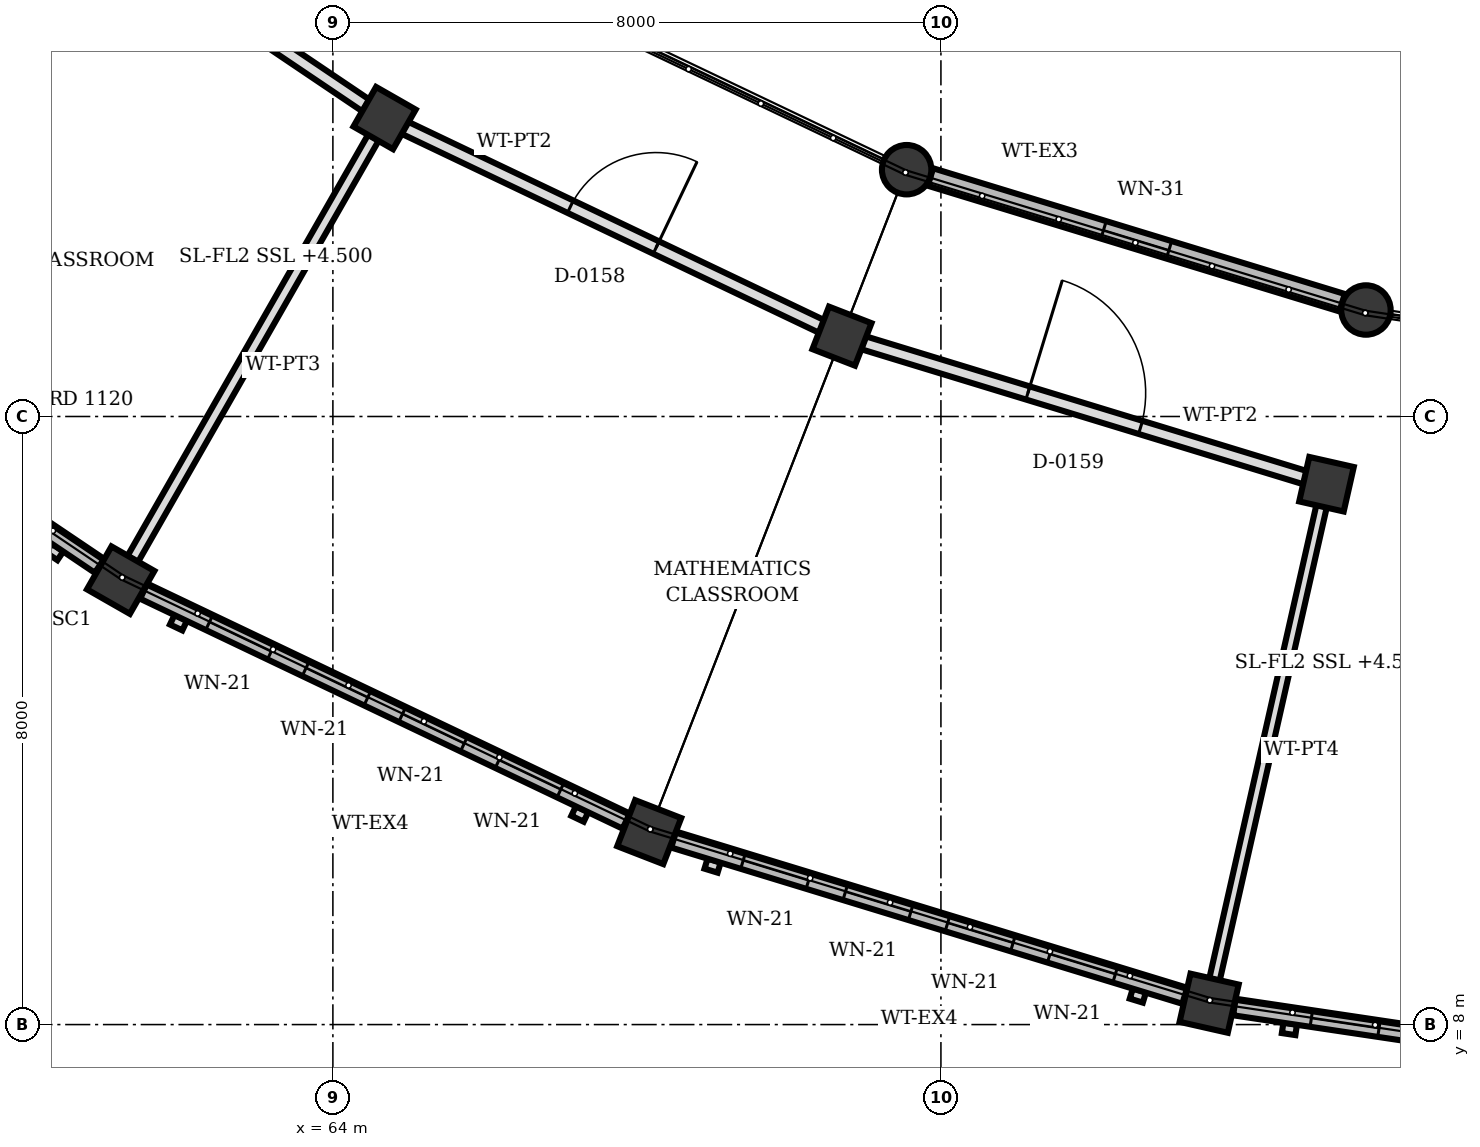
"""IFC4 building model, lengths in metres.
Left out: names, types, materials, properties, quantities, classifications, styles, units other than length and angle.
Written with IfcOpenShell. Run it as: python <this file> out.ifc"""

import sys

from ifc_helpers import new_model, si_unit, direction, frame, frame_2d, origin, origin_2d, place, context, subcontext, project, spatial, rectangle, circle, extrude, element, fill, save


model = new_model("IFC4")
c1 = context("Model", 3, precision=1e-05, world=origin(), true_north=direction((0.0, 1.0)))
c2 = subcontext(c1, "Body", "Model", "MODEL_VIEW")
j1 = project(units=[si_unit("LENGTHUNIT", "METRE"), si_unit("PLANEANGLEUNIT", "RADIAN")], contexts=[c1])
p1 = place(None, origin())
s1 = spatial("IfcSite", under=j1, at=p1, CompositionType="ELEMENT")
p2 = place(p1, origin())
s2 = spatial("IfcBuilding", under=s1, at=p2, CompositionType="ELEMENT")
p3 = place(p2, frame((0.0, 0.0, 4.5)))
s3 = spatial("IfcBuildingStorey", under=s2, at=p3, CompositionType="ELEMENT", Elevation=4.5)
for number, where, z_axis, x_axis in (
    (1, (71.549, 19.247, 0.0), (0.0, 0.0, 1.0), (1.0, 0.0, 0.0)),
    (2, (77.592, 17.401, 0.0), (0.0, 0.0, 1.0), (1.0, 0.0, 0.0)),
):
    element("IfcColumn", number, at=place(p3, frame(where, z_axis=z_axis, x_axis=x_axis)), inside=s3, PredefinedType="COLUMN", context=c2, shape_type="SweptSolid", body=[
        extrude(circle(Radius=0.325, at=origin_2d()), origin(), (0.0, 0.0, 1.0), 5.12),
    ])
for number, where, z_axis, x_axis in (
    (3, (64.68, 19.926, 0.0), (0.0, 0.0, 1.0), (-0.496, -0.868, 0.0)),
    (4, (70.698, 17.057, 0.0), (0.0, 0.0, 1.0), (-0.362, -0.932, 0.0)),
    (5, (77.073, 15.109, 0.0), (0.0, 0.0, 1.0), (-0.221, -0.975, 0.0)),
):
    element("IfcColumn", number, at=place(p3, frame(where, z_axis=z_axis, x_axis=x_axis)), inside=s3, PredefinedType="COLUMN", context=c2, shape_type="SweptSolid", body=[
        extrude(rectangle(XDim=0.6, YDim=0.6, at=origin_2d()), origin(), (0.0, 0.0, 1.0), 4.0),
    ])
for number, where, z_axis, x_axis in (
    (6, (61.208, 13.847, 0.0), (0.0, 0.0, 1.0), (-0.496, -0.868, 0.0)),
    (7, (68.162, 10.532, 0.0), (0.0, 0.0, 1.0), (-0.362, -0.932, 0.0)),
    (8, (75.529, 8.281, 0.0), (0.0, 0.0, 1.0), (-0.221, -0.975, 0.0)),
):
    element("IfcColumn", number, at=place(p3, frame(where, z_axis=z_axis, x_axis=x_axis)), inside=s3, PredefinedType="COLUMN", context=c2, shape_type="SweptSolid", body=[
        extrude(rectangle(XDim=0.65, YDim=0.65, at=origin_2d()), origin(), (0.0, 0.0, 1.0), 4.0),
    ])
p4 = place(p3, frame((60.929, 14.035, 0.0), z_axis=(0.0, 0.0, 1.0), x_axis=(-0.829175809129, 0.558987904659, 0.0)))
e9 = element("IfcWall", 9, at=p4, inside=s3, PredefinedType="SOLIDWALL", context=c2, shape_type="SweptSolid", body=[
    extrude(rectangle(XDim=7.031, YDim=0.22, at=frame_2d((3.515, 0.0))), origin(), (0.0, 0.0, 1.0), 3.172),
])
p5 = place(p4, frame((0.956, 0.0, 0.85)))
e10 = element("IfcOpeningElement", 10, at=p5, cuts=e9, PredefinedType="OPENING", context=c2, shape_type="SweptSolid", body=[
    extrude(rectangle(XDim=0.9, YDim=1.4, at=frame_2d((0.45, 0.7))), frame((0.0, 0.12, 0.0), z_axis=(0.0, -1.0, 0.0), x_axis=(1.0, 0.0, 0.0)), (0.0, 0.0, 1.0), 0.24),
])
p6 = place(p4, frame((2.362, 0.0, 0.85)))
e11 = element("IfcOpeningElement", 11, at=p6, cuts=e9, PredefinedType="OPENING", context=c2, shape_type="SweptSolid", body=[
    extrude(rectangle(XDim=0.9, YDim=1.4, at=frame_2d((0.45, 0.7))), frame((0.0, 0.12, 0.0), z_axis=(0.0, -1.0, 0.0), x_axis=(1.0, 0.0, 0.0)), (0.0, 0.0, 1.0), 0.24),
])
p7 = place(p4, frame((3.769, 0.0, 0.85)))
e12 = element("IfcOpeningElement", 12, at=p7, cuts=e9, PredefinedType="OPENING", context=c2, shape_type="SweptSolid", body=[
    extrude(rectangle(XDim=0.9, YDim=1.4, at=frame_2d((0.45, 0.7))), frame((0.0, 0.12, 0.0), z_axis=(0.0, -1.0, 0.0), x_axis=(1.0, 0.0, 0.0)), (0.0, 0.0, 1.0), 0.24),
])
p8 = place(p4, frame((5.175, 0.0, 0.85)))
e13 = element("IfcOpeningElement", 13, at=p8, cuts=e9, PredefinedType="OPENING", context=c2, shape_type="SweptSolid", body=[
    extrude(rectangle(XDim=0.9, YDim=1.4, at=frame_2d((0.45, 0.7))), frame((0.0, 0.12, 0.0), z_axis=(0.0, -1.0, 0.0), x_axis=(1.0, 0.0, 0.0)), (0.0, 0.0, 1.0), 0.24),
])
p9 = place(p3, frame((67.859, 10.677, 0.0), z_axis=(0.0, 0.0, 1.0), x_axis=(-0.902744968073, 0.43017615301, 0.0)))
e14 = element("IfcWall", 14, at=p9, inside=s3, PredefinedType="SOLIDWALL", context=c2, shape_type="SweptSolid", body=[
    extrude(rectangle(XDim=7.032, YDim=0.22, at=frame_2d((3.516, 0.0))), origin(), (0.0, 0.0, 1.0), 3.172),
])
p10 = place(p9, frame((0.956, 0.0, 0.85)))
e15 = element("IfcOpeningElement", 15, at=p10, cuts=e14, PredefinedType="OPENING", context=c2, shape_type="SweptSolid", body=[
    extrude(rectangle(XDim=0.9, YDim=1.4, at=frame_2d((0.45, 0.7))), frame((0.0, 0.12, 0.0), z_axis=(0.0, -1.0, 0.0), x_axis=(1.0, 0.0, 0.0)), (0.0, 0.0, 1.0), 0.24),
])
p11 = place(p9, frame((2.363, 0.0, 0.85)))
e16 = element("IfcOpeningElement", 16, at=p11, cuts=e14, PredefinedType="OPENING", context=c2, shape_type="SweptSolid", body=[
    extrude(rectangle(XDim=0.9, YDim=1.4, at=frame_2d((0.45, 0.7))), frame((0.0, 0.12, 0.0), z_axis=(0.0, -1.0, 0.0), x_axis=(1.0, 0.0, 0.0)), (0.0, 0.0, 1.0), 0.24),
])
p12 = place(p9, frame((3.769, 0.0, 0.85)))
e17 = element("IfcOpeningElement", 17, at=p12, cuts=e14, PredefinedType="OPENING", context=c2, shape_type="SweptSolid", body=[
    extrude(rectangle(XDim=0.9, YDim=1.4, at=frame_2d((0.45, 0.7))), frame((0.0, 0.12, 0.0), z_axis=(0.0, -1.0, 0.0), x_axis=(1.0, 0.0, 0.0)), (0.0, 0.0, 1.0), 0.24),
])
p13 = place(p9, frame((5.176, 0.0, 0.85)))
e18 = element("IfcOpeningElement", 18, at=p13, cuts=e14, PredefinedType="OPENING", context=c2, shape_type="SweptSolid", body=[
    extrude(rectangle(XDim=0.9, YDim=1.4, at=frame_2d((0.45, 0.7))), frame((0.0, 0.12, 0.0), z_axis=(0.0, -1.0, 0.0), x_axis=(1.0, 0.0, 0.0)), (0.0, 0.0, 1.0), 0.24),
])
p14 = place(p3, frame((75.208, 8.379, 0.0), z_axis=(0.0, 0.0, 1.0), x_axis=(-0.956340250866, 0.292255580912, 0.0)))
e19 = element("IfcWall", 19, at=p14, inside=s3, PredefinedType="SOLIDWALL", context=c2, shape_type="SweptSolid", body=[
    extrude(rectangle(XDim=7.032, YDim=0.22, at=frame_2d((3.516, 0.0))), origin(), (0.0, 0.0, 1.0), 3.172),
])
p15 = place(p14, frame((0.956, 0.0, 0.85)))
e20 = element("IfcOpeningElement", 20, at=p15, cuts=e19, PredefinedType="OPENING", context=c2, shape_type="SweptSolid", body=[
    extrude(rectangle(XDim=0.9, YDim=1.4, at=frame_2d((0.45, 0.7))), frame((0.0, 0.12, 0.0), z_axis=(0.0, -1.0, 0.0), x_axis=(1.0, 0.0, 0.0)), (0.0, 0.0, 1.0), 0.24),
])
p16 = place(p14, frame((2.363, 0.0, 0.85)))
e21 = element("IfcOpeningElement", 21, at=p16, cuts=e19, PredefinedType="OPENING", context=c2, shape_type="SweptSolid", body=[
    extrude(rectangle(XDim=0.9, YDim=1.4, at=frame_2d((0.45, 0.7))), frame((0.0, 0.12, 0.0), z_axis=(0.0, -1.0, 0.0), x_axis=(1.0, 0.0, 0.0)), (0.0, 0.0, 1.0), 0.24),
])
p17 = place(p14, frame((3.769, 0.0, 0.85)))
e22 = element("IfcOpeningElement", 22, at=p17, cuts=e19, PredefinedType="OPENING", context=c2, shape_type="SweptSolid", body=[
    extrude(rectangle(XDim=0.9, YDim=1.4, at=frame_2d((0.45, 0.7))), frame((0.0, 0.12, 0.0), z_axis=(0.0, -1.0, 0.0), x_axis=(1.0, 0.0, 0.0)), (0.0, 0.0, 1.0), 0.24),
])
p18 = place(p14, frame((5.176, 0.0, 0.85)))
e23 = element("IfcOpeningElement", 23, at=p18, cuts=e19, PredefinedType="OPENING", context=c2, shape_type="SweptSolid", body=[
    extrude(rectangle(XDim=0.9, YDim=1.4, at=frame_2d((0.45, 0.7))), frame((0.0, 0.12, 0.0), z_axis=(0.0, -1.0, 0.0), x_axis=(1.0, 0.0, 0.0)), (0.0, 0.0, 1.0), 0.24),
])
p19 = place(p3, frame((71.862, 19.151, 0.0), z_axis=(0.0, 0.0, 1.0), x_axis=(0.956419807649, -0.291995122454, 0.0)))
e24 = element("IfcWall", 24, at=p19, inside=s3, PredefinedType="SOLIDWALL", context=c2, shape_type="SweptSolid", body=[
    extrude(rectangle(XDim=5.664, YDim=0.24, at=frame_2d((2.832, 0.0))), origin(), (0.0, 0.0, 1.0), 3.55),
])
p20 = place(p19, frame((2.382, 0.0, 0.9)))
e25 = element("IfcOpeningElement", 25, at=p20, cuts=e24, PredefinedType="OPENING", context=c2, shape_type="SweptSolid", body=[
    extrude(rectangle(XDim=0.9, YDim=1.55, at=frame_2d((0.45, 0.775))), frame((0.0, 0.13, 0.0), z_axis=(0.0, -1.0, 0.0), x_axis=(1.0, 0.0, 0.0)), (0.0, 0.0, 1.0), 0.26),
])
p21 = place(p3, frame((83.148, 7.143, 0.0), z_axis=(0.0, 0.0, 1.0), x_axis=(-0.989038445117, 0.147658234042, 0.0)))
e26 = element("IfcWall", 26, at=p21, inside=s3, PredefinedType="SOLIDWALL", context=c2, shape_type="SweptSolid", body=[
    extrude(rectangle(XDim=7.368, YDim=0.22, at=frame_2d((3.684, 0.0))), origin(), (0.0, 0.0, 1.0), 3.55),
])
p22 = place(p21, frame((1.024, 0.0, 0.85)))
e27 = element("IfcOpeningElement", 27, at=p22, cuts=e26, PredefinedType="OPENING", context=c2, shape_type="SweptSolid", body=[
    extrude(rectangle(XDim=0.9, YDim=1.4, at=frame_2d((0.45, 0.7))), frame((0.0, 0.12, 0.0), z_axis=(0.0, -1.0, 0.0), x_axis=(1.0, 0.0, 0.0)), (0.0, 0.0, 1.0), 0.24),
])
p23 = place(p21, frame((2.497, 0.0, 0.85)))
e28 = element("IfcOpeningElement", 28, at=p23, cuts=e26, PredefinedType="OPENING", context=c2, shape_type="SweptSolid", body=[
    extrude(rectangle(XDim=0.9, YDim=1.4, at=frame_2d((0.45, 0.7))), frame((0.0, 0.12, 0.0), z_axis=(0.0, -1.0, 0.0), x_axis=(1.0, 0.0, 0.0)), (0.0, 0.0, 1.0), 0.24),
])
p24 = place(p21, frame((3.971, 0.0, 0.85)))
e29 = element("IfcOpeningElement", 29, at=p24, cuts=e26, PredefinedType="OPENING", context=c2, shape_type="SweptSolid", body=[
    extrude(rectangle(XDim=0.9, YDim=1.4, at=frame_2d((0.45, 0.7))), frame((0.0, 0.12, 0.0), z_axis=(0.0, -1.0, 0.0), x_axis=(1.0, 0.0, 0.0)), (0.0, 0.0, 1.0), 0.24),
])
p25 = place(p21, frame((5.444, 0.0, 0.85)))
e30 = element("IfcOpeningElement", 30, at=p25, cuts=e26, PredefinedType="OPENING", context=c2, shape_type="SweptSolid", body=[
    extrude(rectangle(XDim=0.9, YDim=1.4, at=frame_2d((0.45, 0.7))), frame((0.0, 0.12, 0.0), z_axis=(0.0, -1.0, 0.0), x_axis=(1.0, 0.0, 0.0)), (0.0, 0.0, 1.0), 0.24),
])
p26 = place(p3, frame((64.535, 19.672, 0.0), z_axis=(0.0, 0.0, 1.0), x_axis=(-0.495957929612, -0.868346550667, 0.0)))
e31 = element("IfcWall", 31, at=p26, inside=s3, PredefinedType="PARTITIONING", context=c2, shape_type="SweptSolid", body=[
    extrude(rectangle(XDim=6.392, YDim=0.16, at=frame_2d((3.196, 0.0))), origin(), (0.0, 0.0, 1.0), 3.072),
])
p27 = place(p3, frame((77.009, 14.824, 0.0), z_axis=(0.0, 0.0, 1.0), x_axis=(-0.220597347052, -0.975364962706, 0.0)))
e32 = element("IfcWall", 32, at=p27, inside=s3, PredefinedType="PARTITIONING", context=c2, shape_type="SweptSolid", body=[
    extrude(rectangle(XDim=6.391, YDim=0.14, at=frame_2d((3.196, 0.0))), origin(), (0.0, 0.0, 1.0), 3.072),
])
p28 = place(p3, frame((59.395, 23.488, 0.0), z_axis=(0.0, 0.0, 1.0), x_axis=(0.829259954876, -0.558863066626, 0.0)))
e33 = element("IfcWall", 33, at=p28, inside=s3, PredefinedType="PARTITIONING", context=c2, shape_type="SweptSolid", body=[
    extrude(rectangle(XDim=6.08, YDim=0.18, at=frame_2d((3.04, 0.0))), origin(), (0.0, 0.0, 1.0), 3.072),
])
p29 = place(p28, frame((2.55, 0.0, 0.0)))
e34 = element("IfcOpeningElement", 34, at=p29, cuts=e33, PredefinedType="OPENING", context=c2, shape_type="SweptSolid", body=[
    extrude(rectangle(XDim=0.98, YDim=2.2, at=frame_2d((0.49, 1.1))), frame((0.0, 0.1, 0.0), z_axis=(0.0, -1.0, 0.0), x_axis=(1.0, 0.0, 0.0)), (0.0, 0.0, 1.0), 0.2),
])
p30 = place(p3, frame((64.944, 19.8, 0.0), z_axis=(0.0, 0.0, 1.0), x_axis=(0.902690527885, -0.430290379704, 0.0)))
e35 = element("IfcWall", 35, at=p30, inside=s3, PredefinedType="PARTITIONING", context=c2, shape_type="SweptSolid", body=[
    extrude(rectangle(XDim=6.082, YDim=0.18, at=frame_2d((3.041, 0.0))), origin(), (0.0, 0.0, 1.0), 3.072),
])
p31 = place(p30, frame((2.416, 0.0, 0.0)))
e36 = element("IfcOpeningElement", 36, at=p31, cuts=e35, PredefinedType="OPENING", context=c2, shape_type="SweptSolid", body=[
    extrude(rectangle(XDim=1.25, YDim=2.2, at=frame_2d((0.625, 1.1))), frame((0.0, 0.1, 0.0), z_axis=(0.0, -1.0, 0.0), x_axis=(1.0, 0.0, 0.0)), (0.0, 0.0, 1.0), 0.2),
])
p32 = place(p3, frame((70.978, 16.971, 0.0), z_axis=(0.0, 0.0, 1.0), x_axis=(0.956393330743, -0.292081832556, 0.0)))
e37 = element("IfcWall", 37, at=p32, inside=s3, PredefinedType="PARTITIONING", context=c2, shape_type="SweptSolid", body=[
    extrude(rectangle(XDim=6.08, YDim=0.18, at=frame_2d((3.04, 0.0))), origin(), (0.0, 0.0, 1.0), 3.072),
])
p33 = place(p32, frame((2.265, 0.0, 0.0)))
e38 = element("IfcOpeningElement", 38, at=p33, cuts=e37, PredefinedType="OPENING", context=c2, shape_type="SweptSolid", body=[
    extrude(rectangle(XDim=1.55, YDim=2.2, at=frame_2d((0.775, 1.1))), frame((0.0, 0.1, 0.0), z_axis=(0.0, -1.0, 0.0), x_axis=(1.0, 0.0, 0.0)), (0.0, 0.0, 1.0), 0.2),
])
p34 = place(p10, origin())
e39 = element("IfcWindow", 39, at=p34, inside=s3, PartitioningType="SINGLE_PANEL", PredefinedType="WINDOW", context=c2, shape_type="SweptSolid", body=[
    extrude(rectangle(XDim=0.9, YDim=1.4, at=frame_2d((0.45, 0.7))), frame((0.0, 0.03, 0.0), z_axis=(0.0, -1.0, 0.0), x_axis=(1.0, 0.0, 0.0)), (0.0, 0.0, 1.0), 0.06),
])
fill(e15, e39)
p35 = place(p11, origin())
e40 = element("IfcWindow", 40, at=p35, inside=s3, PartitioningType="SINGLE_PANEL", PredefinedType="WINDOW", context=c2, shape_type="SweptSolid", body=[
    extrude(rectangle(XDim=0.9, YDim=1.4, at=frame_2d((0.45, 0.7))), frame((0.0, 0.03, 0.0), z_axis=(0.0, -1.0, 0.0), x_axis=(1.0, 0.0, 0.0)), (0.0, 0.0, 1.0), 0.06),
])
fill(e16, e40)
p36 = place(p12, origin())
e41 = element("IfcWindow", 41, at=p36, inside=s3, PartitioningType="SINGLE_PANEL", PredefinedType="WINDOW", context=c2, shape_type="SweptSolid", body=[
    extrude(rectangle(XDim=0.9, YDim=1.4, at=frame_2d((0.45, 0.7))), frame((0.0, 0.03, 0.0), z_axis=(0.0, -1.0, 0.0), x_axis=(1.0, 0.0, 0.0)), (0.0, 0.0, 1.0), 0.06),
])
fill(e17, e41)
p37 = place(p13, origin())
e42 = element("IfcWindow", 42, at=p37, inside=s3, PartitioningType="SINGLE_PANEL", PredefinedType="WINDOW", context=c2, shape_type="SweptSolid", body=[
    extrude(rectangle(XDim=0.9, YDim=1.4, at=frame_2d((0.45, 0.7))), frame((0.0, 0.03, 0.0), z_axis=(0.0, -1.0, 0.0), x_axis=(1.0, 0.0, 0.0)), (0.0, 0.0, 1.0), 0.06),
])
fill(e18, e42)
p38 = place(p15, origin())
e43 = element("IfcWindow", 43, at=p38, inside=s3, PartitioningType="SINGLE_PANEL", PredefinedType="WINDOW", context=c2, shape_type="SweptSolid", body=[
    extrude(rectangle(XDim=0.9, YDim=1.4, at=frame_2d((0.45, 0.7))), frame((0.0, 0.03, 0.0), z_axis=(0.0, -1.0, 0.0), x_axis=(1.0, 0.0, 0.0)), (0.0, 0.0, 1.0), 0.06),
])
fill(e20, e43)
p39 = place(p16, origin())
e44 = element("IfcWindow", 44, at=p39, inside=s3, PartitioningType="SINGLE_PANEL", PredefinedType="WINDOW", context=c2, shape_type="SweptSolid", body=[
    extrude(rectangle(XDim=0.9, YDim=1.4, at=frame_2d((0.45, 0.7))), frame((0.0, 0.03, 0.0), z_axis=(0.0, -1.0, 0.0), x_axis=(1.0, 0.0, 0.0)), (0.0, 0.0, 1.0), 0.06),
])
fill(e21, e44)
p40 = place(p17, origin())
e45 = element("IfcWindow", 45, at=p40, inside=s3, PartitioningType="SINGLE_PANEL", PredefinedType="WINDOW", context=c2, shape_type="SweptSolid", body=[
    extrude(rectangle(XDim=0.9, YDim=1.4, at=frame_2d((0.45, 0.7))), frame((0.0, 0.03, 0.0), z_axis=(0.0, -1.0, 0.0), x_axis=(1.0, 0.0, 0.0)), (0.0, 0.0, 1.0), 0.06),
])
fill(e22, e45)
p41 = place(p18, origin())
e46 = element("IfcWindow", 46, at=p41, inside=s3, PartitioningType="SINGLE_PANEL", PredefinedType="WINDOW", context=c2, shape_type="SweptSolid", body=[
    extrude(rectangle(XDim=0.9, YDim=1.4, at=frame_2d((0.45, 0.7))), frame((0.0, 0.03, 0.0), z_axis=(0.0, -1.0, 0.0), x_axis=(1.0, 0.0, 0.0)), (0.0, 0.0, 1.0), 0.06),
])
fill(e23, e46)
p42 = place(p20, origin())
e47 = element("IfcWindow", 47, at=p42, inside=s3, PartitioningType="SINGLE_PANEL", PredefinedType="WINDOW", context=c2, shape_type="SweptSolid", body=[
    extrude(rectangle(XDim=0.9, YDim=1.55, at=frame_2d((0.45, 0.775))), frame((0.0, 0.03, 0.0), z_axis=(0.0, -1.0, 0.0), x_axis=(1.0, 0.0, 0.0)), (0.0, 0.0, 1.0), 0.06),
])
fill(e25, e47)
p43 = place(p25, origin())
e48 = element("IfcWindow", 48, at=p43, inside=s3, PartitioningType="SINGLE_PANEL", PredefinedType="WINDOW", context=c2, shape_type="SweptSolid", body=[
    extrude(rectangle(XDim=0.9, YDim=1.4, at=frame_2d((0.45, 0.7))), frame((0.0, 0.03, 0.0), z_axis=(0.0, -1.0, 0.0), x_axis=(1.0, 0.0, 0.0)), (0.0, 0.0, 1.0), 0.06),
])
fill(e30, e48)
p44 = place(p31, origin())
e49 = element("IfcDoor", 49, at=p44, inside=s3, OperationType="SINGLE_SWING_RIGHT", PredefinedType="DOOR", context=c2, shape_type="SweptSolid", body=[
    extrude(rectangle(XDim=1.25, YDim=2.2, at=frame_2d((0.625, 1.1))), frame((0.0, 0.025, 0.0), z_axis=(0.0, -1.0, 0.0), x_axis=(1.0, 0.0, 0.0)), (0.0, 0.0, 1.0), 0.05),
])
fill(e36, e49)
p45 = place(p33, origin())
e50 = element("IfcDoor", 50, at=p45, inside=s3, OperationType="SINGLE_SWING_LEFT", PredefinedType="DOOR", context=c2, shape_type="SweptSolid", body=[
    extrude(rectangle(XDim=1.55, YDim=2.2, at=frame_2d((0.775, 1.1))), frame((0.0, 0.025, 0.0), z_axis=(0.0, -1.0, 0.0), x_axis=(1.0, 0.0, 0.0)), (0.0, 0.0, 1.0), 0.05),
])
fill(e38, e50)
save(model, sys.argv[1])
